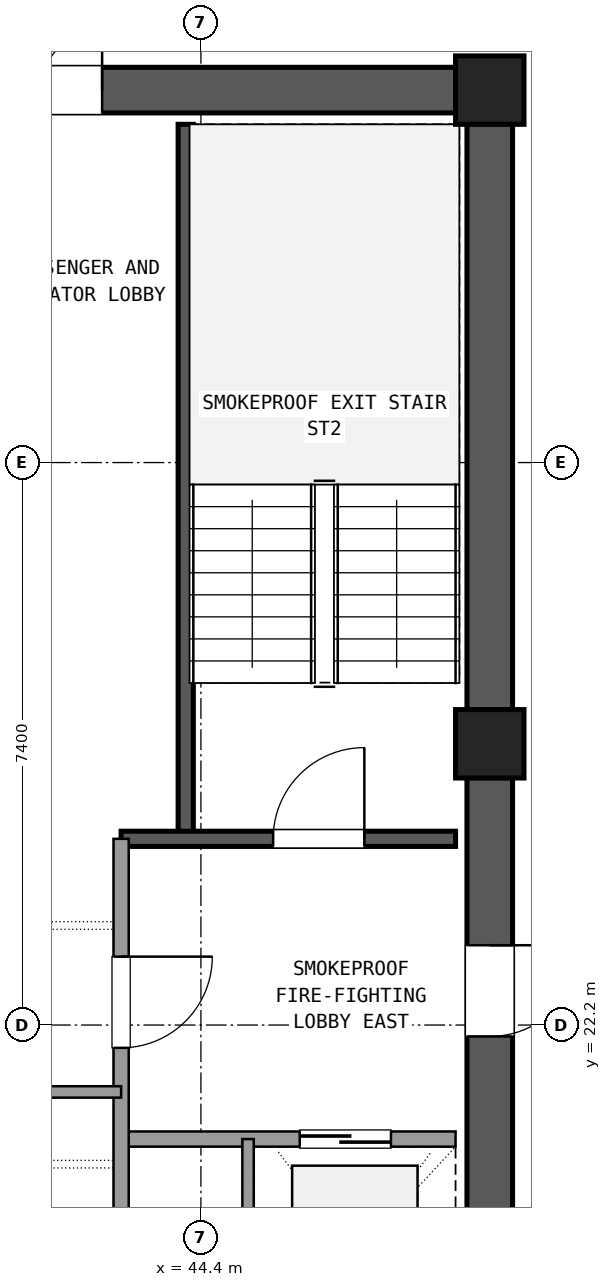
"""IFC4 building model, lengths in metres.
Left out: names, types, materials, properties, quantities, classifications, styles, units other than length and angle.
Written with IfcOpenShell. Run it as: python <this file> out.ifc"""

import sys

from ifc_helpers import new_model, si_unit, direction, frame, frame_2d, origin, origin_2d, place, context, subcontext, project, spatial, rectangle, extrude, element, fill, save


model = new_model("IFC4")
c1 = context("Model", 3, precision=1e-05, world=origin(), true_north=direction((0.0, 1.0)))
c2 = subcontext(c1, "Body", "Model", "MODEL_VIEW")
j1 = project(units=[si_unit("LENGTHUNIT", "METRE"), si_unit("PLANEANGLEUNIT", "RADIAN")], contexts=[c1])
p1 = place(None, origin())
s1 = spatial("IfcSite", under=j1, at=p1, CompositionType="ELEMENT")
p2 = place(p1, origin())
s2 = spatial("IfcBuilding", under=s1, at=p2, CompositionType="ELEMENT")
p3 = place(p2, frame((0.0, 0.0, 228.78)))
s3 = spatial("IfcBuildingStorey", under=s2, at=p3, CompositionType="ELEMENT", Elevation=228.78)
for number, where, z_axis, x_axis in (
    (1, (48.2, 25.9, 0.0), (0.0, 0.0, 1.0), (1.0, 0.0, 0.0)),
    (2, (48.2, 34.5, 0.0), (0.0, 0.0, 1.0), (1.0, 0.0, 0.0)),
):
    element("IfcColumn", number, at=place(p3, frame(where, z_axis=z_axis, x_axis=x_axis)), inside=s3, PredefinedType="COLUMN", context=c2, shape_type="SweptSolid", body=[
        extrude(rectangle(XDim=0.9, YDim=0.9, at=origin_2d()), origin(), (0.0, 0.0, 1.0), 3.6),
    ])
p4 = place(p3, frame((48.2, 17.745, 0.0), z_axis=(0.0, 0.0, 1.0), x_axis=(0.0, 1.0, 0.0)))
e3 = element("IfcWall", 3, at=p4, inside=s3, PredefinedType="SHEAR", context=c2, shape_type="SweptSolid", body=[
    extrude(rectangle(XDim=7.71, YDim=0.6, at=frame_2d((3.855, 0.0))), origin(), (0.0, 0.0, 1.0), 3.3),
])
p5 = place(p4, frame((4.305, 0.0, 0.0)))
e4 = element("IfcOpeningElement", 4, at=p5, cuts=e3, PredefinedType="OPENING", context=c2, shape_type="SweptSolid", body=[
    extrude(rectangle(XDim=1.2, YDim=2.15, at=frame_2d((0.6, 1.075))), frame((0.0, 0.31, 0.0), z_axis=(0.0, -1.0, 0.0), x_axis=(1.0, 0.0, 0.0)), (0.0, 0.0, 1.0), 0.62),
])
p6 = place(p3, frame((48.2, 26.345, 0.0), z_axis=(0.0, 0.0, 1.0), x_axis=(0.0, 1.0, 0.0)))
e5 = element("IfcWall", 5, at=p6, inside=s3, PredefinedType="SHEAR", context=c2, shape_type="SweptSolid", body=[
    extrude(rectangle(XDim=7.71, YDim=0.6, at=frame_2d((3.855, 0.0))), origin(), (0.0, 0.0, 1.0), 3.3),
])
p7 = place(p3, frame((47.755, 34.5, 0.0), z_axis=(0.0, 0.0, 1.0), x_axis=(-1.0, 0.0, 0.0)))
e6 = element("IfcWall", 6, at=p7, inside=s3, PredefinedType="SHEAR", context=c2, shape_type="SweptSolid", body=[
    extrude(rectangle(XDim=10.31, YDim=0.6, at=frame_2d((5.155, 0.0))), origin(), (0.0, 0.0, 1.0), 3.3),
])
p8 = place(p7, frame((4.655, 0.0, 0.0)))
e7 = element("IfcOpeningElement", 7, at=p8, cuts=e6, PredefinedType="OPENING", context=c2, shape_type="SweptSolid", body=[
    extrude(rectangle(XDim=1.6, YDim=2.2, at=frame_2d((0.8, 1.1))), frame((0.0, 0.31, 0.0), z_axis=(0.0, -1.0, 0.0), x_axis=(1.0, 0.0, 0.0)), (0.0, 0.0, 1.0), 0.62),
])
p9 = place(p3, frame((44.2, 24.65, 0.0), z_axis=(0.0, 0.0, 1.0), x_axis=(0.0, 1.0, 0.0)))
e8 = element("IfcWall", 8, at=p9, inside=s3, PredefinedType="SHEAR", context=c2, shape_type="SweptSolid", body=[
    extrude(rectangle(XDim=9.4, YDim=0.2, at=frame_2d((4.7, 0.0))), origin(), (0.0, 0.0, 1.0), 3.3),
])
p10 = place(p3, frame((43.35, 24.65, 0.0), z_axis=(0.0, 0.0, 1.0), x_axis=(1.0, 0.0, 0.0)))
e9 = element("IfcWall", 9, at=p10, inside=s3, PredefinedType="SHEAR", context=c2, shape_type="SweptSolid", body=[
    extrude(rectangle(XDim=4.4, YDim=0.2, at=frame_2d((2.2, 0.0))), origin(), (0.0, 0.0, 1.0), 3.3),
])
p11 = place(p10, frame((2.0, 0.0, 0.0)))
e10 = element("IfcOpeningElement", 10, at=p11, cuts=e9, PredefinedType="OPENING", context=c2, shape_type="SweptSolid", body=[
    extrude(rectangle(XDim=1.2, YDim=2.15, at=frame_2d((0.6, 1.075))), frame((0.0, 0.11, 0.0), z_axis=(0.0, -1.0, 0.0), x_axis=(1.0, 0.0, 0.0)), (0.0, 0.0, 1.0), 0.22),
])
p12 = place(p3, frame((43.35, 20.7, 0.0), z_axis=(0.0, 0.0, 1.0), x_axis=(1.0, 0.0, 0.0)))
e11 = element("IfcWall", 11, at=p12, inside=s3, PredefinedType="SOLIDWALL", context=c2, shape_type="SweptSolid", body=[
    extrude(rectangle(XDim=4.4, YDim=0.2, at=frame_2d((2.2, 0.0))), origin(), (0.0, 0.0, 1.0), 2.59),
])
p13 = place(p12, frame((2.35, 0.0, 0.0)))
e12 = element("IfcOpeningElement", 12, at=p13, cuts=e11, PredefinedType="OPENING", context=c2, shape_type="SweptSolid", body=[
    extrude(rectangle(XDim=1.2, YDim=2.15, at=frame_2d((0.6, 1.075))), frame((0.0, 0.11, 0.0), z_axis=(0.0, -1.0, 0.0), x_axis=(1.0, 0.0, 0.0)), (0.0, 0.0, 1.0), 0.22),
])
p14 = place(p3, frame((43.35, 17.75, 0.0), z_axis=(0.0, 0.0, 1.0), x_axis=(0.0, 1.0, 0.0)))
e13 = element("IfcWall", 13, at=p14, inside=s3, PredefinedType="SOLIDWALL", context=c2, shape_type="SweptSolid", body=[
    extrude(rectangle(XDim=6.9, YDim=0.2, at=frame_2d((3.45, 0.0))), origin(), (0.0, 0.0, 1.0), 2.59),
])
p15 = place(p14, frame((4.15, 0.0, 0.0)))
e14 = element("IfcOpeningElement", 14, at=p15, cuts=e13, PredefinedType="OPENING", context=c2, shape_type="SweptSolid", body=[
    extrude(rectangle(XDim=1.2, YDim=2.15, at=frame_2d((0.6, 1.075))), frame((0.0, 0.11, 0.0), z_axis=(0.0, -1.0, 0.0), x_axis=(1.0, 0.0, 0.0)), (0.0, 0.0, 1.0), 0.22),
])
p16 = place(p3, frame((45.02, 17.75, 0.0), z_axis=(0.0, 0.0, 1.0), x_axis=(0.0, 1.0, 0.0)))
e15 = element("IfcWall", 15, at=p16, inside=s3, PredefinedType="PARTITIONING", context=c2, shape_type="SweptSolid", body=[
    extrude(rectangle(XDim=2.95, YDim=0.15, at=frame_2d((1.475, 0.0))), origin(), (0.0, 0.0, 1.0), 2.59),
])
p17 = place(p3, frame((37.25, 21.32, 0.0), z_axis=(0.0, 0.0, 1.0), x_axis=(1.0, 0.0, 0.0)))
e16 = element("IfcWall", 16, at=p17, inside=s3, PredefinedType="PARTITIONING", context=c2, shape_type="SweptSolid", body=[
    extrude(rectangle(XDim=6.1, YDim=0.15, at=frame_2d((3.05, 0.0))), origin(), (0.0, 0.0, 1.0), 2.59),
])
p18 = place(p17, frame((0.55, 0.0, 0.0)))
e17 = element("IfcOpeningElement", 17, at=p18, cuts=e16, PredefinedType="OPENING", context=c2, shape_type="SweptSolid", body=[
    extrude(rectangle(XDim=1.0, YDim=2.15, at=frame_2d((0.5, 1.075))), frame((0.0, 0.085, 0.0), z_axis=(0.0, -1.0, 0.0), x_axis=(1.0, 0.0, 0.0)), (0.0, 0.0, 1.0), 0.17),
])
p19 = place(p17, frame((3.5, 0.0, 0.0)))
e18 = element("IfcOpeningElement", 18, at=p19, cuts=e16, PredefinedType="OPENING", context=c2, shape_type="SweptSolid", body=[
    extrude(rectangle(XDim=1.0, YDim=2.15, at=frame_2d((0.5, 1.075))), frame((0.0, 0.085, 0.0), z_axis=(0.0, -1.0, 0.0), x_axis=(1.0, 0.0, 0.0)), (0.0, 0.0, 1.0), 0.17),
])
p20 = place(p11, origin())
e19 = element("IfcDoor", 19, at=p20, inside=s3, OperationType="SINGLE_SWING_RIGHT", PredefinedType="DOOR", context=c2, shape_type="SweptSolid", body=[
    extrude(rectangle(XDim=1.2, YDim=2.15, at=frame_2d((0.6, 1.075))), frame((0.0, 0.025, 0.0), z_axis=(0.0, -1.0, 0.0), x_axis=(1.0, 0.0, 0.0)), (0.0, 0.0, 1.0), 0.05),
])
fill(e10, e19)
p21 = place(p13, origin())
e20 = element("IfcDoor", 20, at=p21, inside=s3, OperationType="SLIDING_TO_RIGHT", PredefinedType="DOOR", context=c2, shape_type="SweptSolid", body=[
    extrude(rectangle(XDim=1.2, YDim=2.15, at=frame_2d((0.6, 1.075))), frame((0.0, 0.025, 0.0), z_axis=(0.0, -1.0, 0.0), x_axis=(1.0, 0.0, 0.0)), (0.0, 0.0, 1.0), 0.05),
])
fill(e12, e20)
p22 = place(p15, frame((1.2, 0.0, 0.0), z_axis=(0.0, 0.0, 1.0), x_axis=(-1.0, 0.0, 0.0)))
e21 = element("IfcDoor", 21, at=p22, inside=s3, OperationType="SINGLE_SWING_RIGHT", PredefinedType="DOOR", context=c2, shape_type="SweptSolid", body=[
    extrude(rectangle(XDim=1.2, YDim=2.15, at=frame_2d((0.6, 1.075))), frame((0.0, 0.025, 0.0), z_axis=(0.0, -1.0, 0.0), x_axis=(1.0, 0.0, 0.0)), (0.0, 0.0, 1.0), 0.05),
])
fill(e14, e21)
p23 = place(p5, frame((1.2, 0.0, 0.0), z_axis=(0.0, 0.0, 1.0), x_axis=(-1.0, 0.0, 0.0)))
e22 = element("IfcDoor", 22, at=p23, inside=s3, OperationType="SINGLE_SWING_RIGHT", PredefinedType="DOOR", context=c2, shape_type="SweptSolid", body=[
    extrude(rectangle(XDim=1.2, YDim=2.15, at=frame_2d((0.6, 1.075))), frame((0.0, 0.025, 0.0), z_axis=(0.0, -1.0, 0.0), x_axis=(1.0, 0.0, 0.0)), (0.0, 0.0, 1.0), 0.05),
])
fill(e4, e22)
p24 = place(p8, frame((1.6, 0.0, 0.0), z_axis=(0.0, 0.0, 1.0), x_axis=(-1.0, 0.0, 0.0)))
e23 = element("IfcDoor", 23, at=p24, inside=s3, OperationType="DOUBLE_DOOR_SINGLE_SWING", PredefinedType="DOOR", context=c2, shape_type="SweptSolid", body=[
    extrude(rectangle(XDim=1.6, YDim=2.2, at=frame_2d((0.8, 1.1))), frame((0.0, 0.025, 0.0), z_axis=(0.0, -1.0, 0.0), x_axis=(1.0, 0.0, 0.0)), (0.0, 0.0, 1.0), 0.05),
])
fill(e7, e23)
save(model, sys.argv[1])
